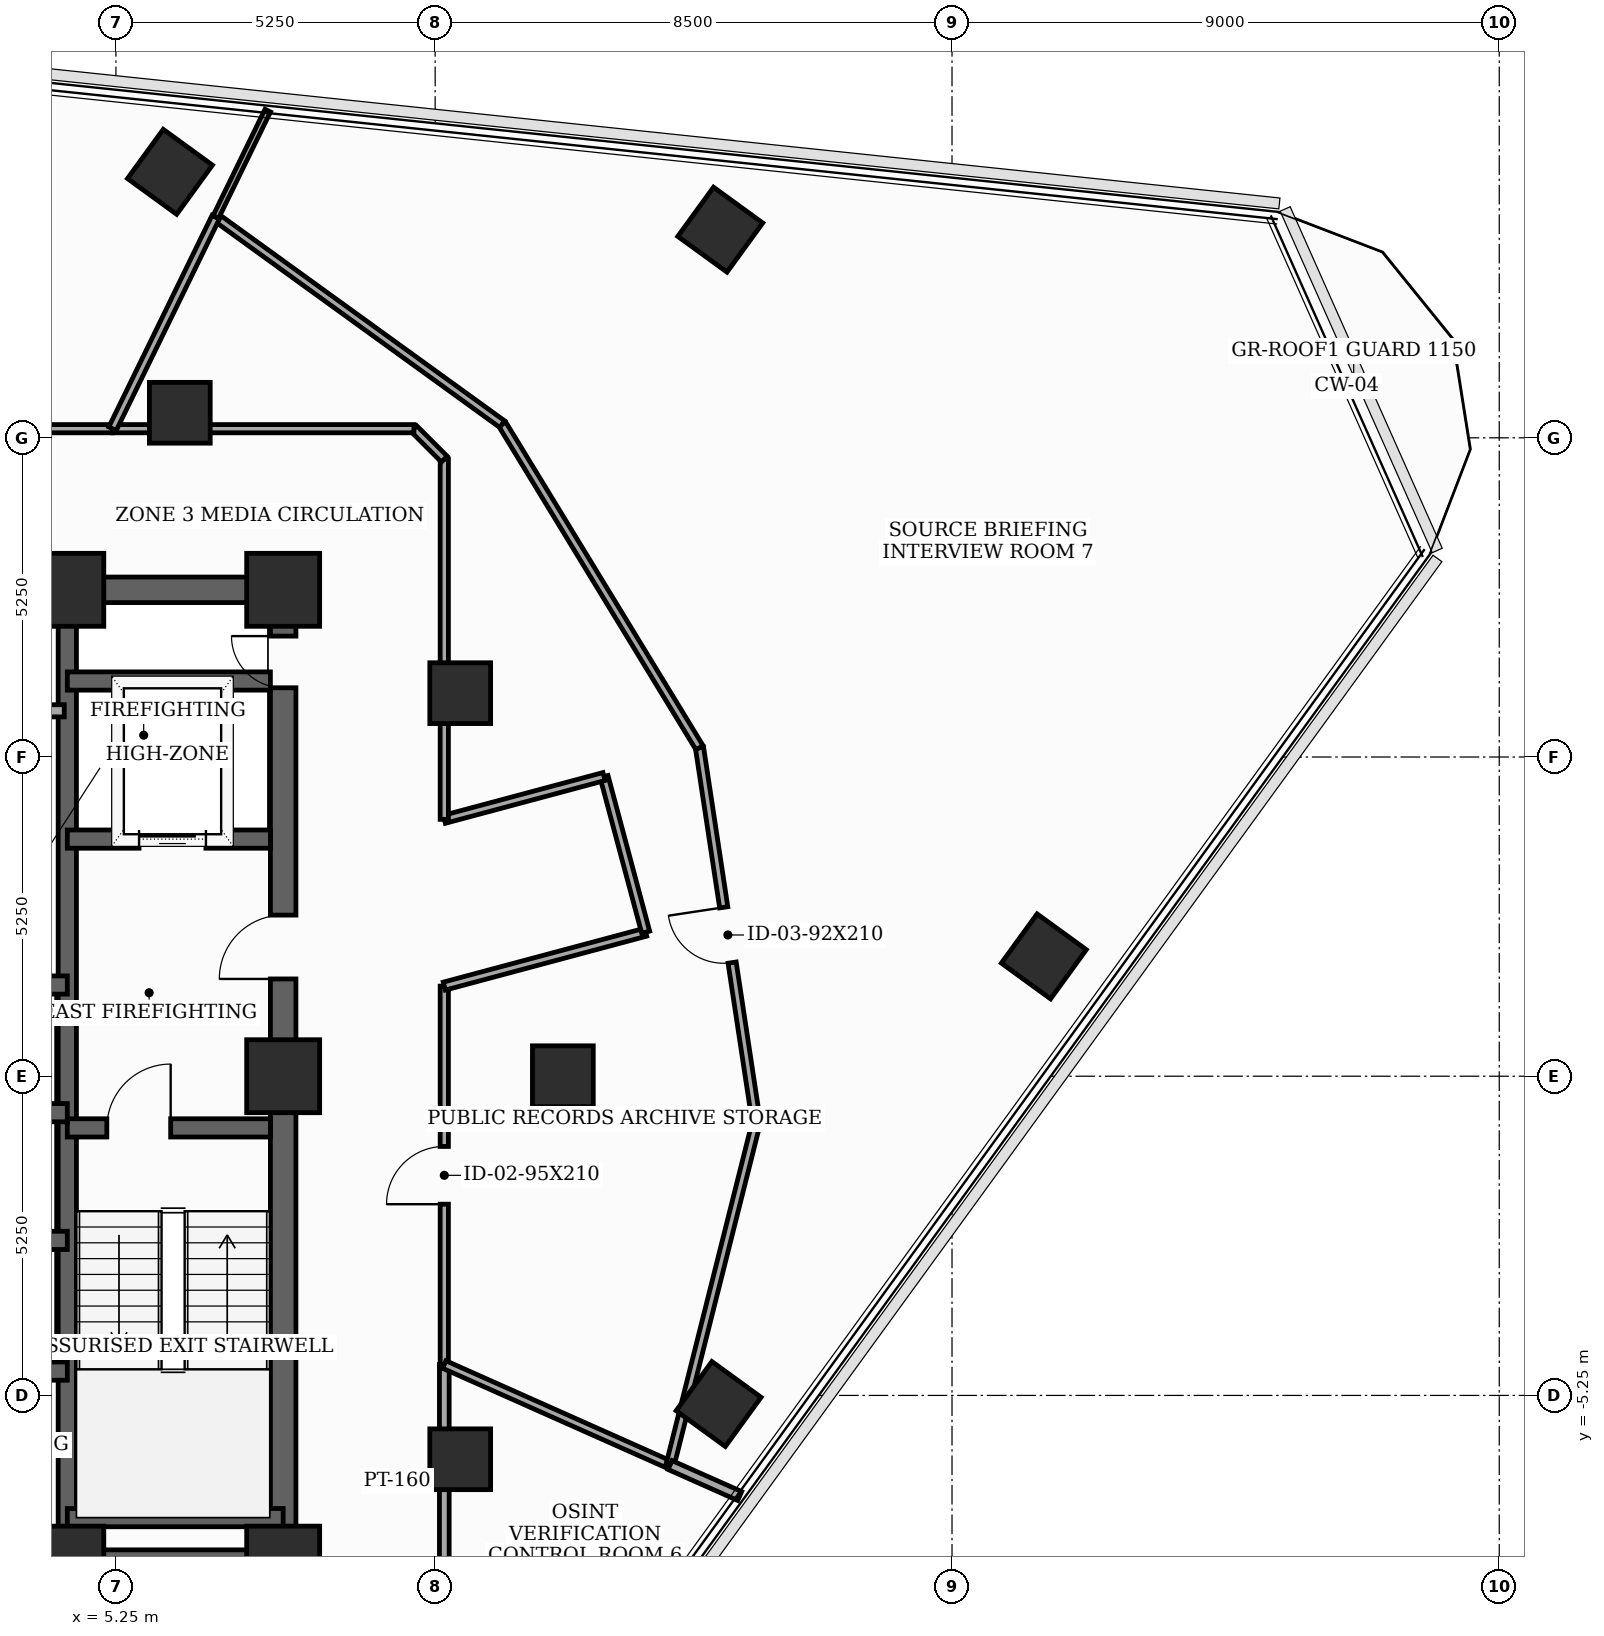
"""IFC4 building model, lengths in metres.
Left out: names, types, materials, properties, quantities, classifications, styles, units other than length and angle.
Written with IfcOpenShell. Run it as: python <this file> out.ifc"""

import sys

from ifc_helpers import new_model, si_unit, direction, frame, frame_2d, origin, origin_2d, place, context, subcontext, project, spatial, rectangle, extrude, element, fill, save


model = new_model("IFC4")
c1 = context("Model", 3, precision=1e-05, world=origin(), true_north=direction((0.0, 1.0)))
c2 = subcontext(c1, "Body", "Model", "MODEL_VIEW")
j1 = project(units=[si_unit("LENGTHUNIT", "METRE"), si_unit("PLANEANGLEUNIT", "RADIAN")], contexts=[c1])
p1 = place(None, origin())
s1 = spatial("IfcSite", under=j1, at=p1, CompositionType="ELEMENT")
p2 = place(p1, origin())
s2 = spatial("IfcBuilding", under=s1, at=p2, CompositionType="ELEMENT")
p3 = place(p2, frame((0.0, 0.0, 237.4)))
s3 = spatial("IfcBuildingStorey", under=s2, at=p3, CompositionType="ELEMENT", Elevation=237.4)
for number, where, z_axis, x_axis in (
    (1, (4.45, -8.0, 0.0), (0.0, 0.0, 1.0), (1.0, 0.0, 0.0)),
    (2, (8.0, -8.0, 0.0), (0.0, 0.0, 1.0), (1.0, 0.0, 0.0)),
    (3, (8.0, 0.0, 0.0), (0.0, 0.0, 1.0), (1.0, 0.0, 0.0)),
    (4, (8.0, 8.0, 0.0), (0.0, 0.0, 1.0), (1.0, 0.0, 0.0)),
    (5, (4.45, 8.0, 0.0), (0.0, 0.0, 1.0), (1.0, 0.0, 0.0)),
):
    element("IfcColumn", number, at=place(p3, frame(where, z_axis=z_axis, x_axis=x_axis)), inside=s3, PredefinedType="COLUMN", context=c2, shape_type="SweptSolid", body=[
        extrude(rectangle(XDim=1.2, YDim=1.2, at=origin_2d()), origin(), (0.0, 0.0, 1.0), 3.7),
    ])
for number, where, z_axis, x_axis in (
    (6, (12.6, 0.0, 0.0), (0.0, 0.0, 1.0), (1.0, 0.0, 0.0)),
    (7, (10.912, 6.3, 0.0), (0.0, 0.0, 1.0), (1.0, 0.0, 0.0)),
    (8, (6.3, 10.912, 0.0), (0.0, 0.0, 1.0), (1.0, 0.0, 0.0)),
    (9, (10.912, -6.3, 0.0), (0.0, 0.0, 1.0), (1.0, 0.0, 0.0)),
    (10, (15.161, -5.391, 0.0), (0.0, 0.0, 1.0), (0.588, 0.809, 0.0)),
    (11, (20.51, 1.971, 0.0), (0.0, 0.0, 1.0), (0.588, 0.809, 0.0)),
    (12, (15.188, 13.923, 0.0), (0.0, 0.0, 1.0), (0.588, 0.809, 0.0)),
    (13, (6.138, 14.875, 0.0), (0.0, 0.0, 1.0), (0.588, 0.809, 0.0)),
):
    element("IfcColumn", number, at=place(p3, frame(where, z_axis=z_axis, x_axis=x_axis)), inside=s3, PredefinedType="COLUMN", context=c2, shape_type="SweptSolid", body=[
        extrude(rectangle(XDim=1.0, YDim=1.0, at=origin_2d()), origin(), (0.0, 0.0, 1.0), 3.7),
    ])
p4 = place(p3, frame((8.0, -8.0, 0.0), z_axis=(0.0, 0.0, 1.0), x_axis=(0.0, 1.0, 0.0)))
e14 = element("IfcWall", 14, at=p4, inside=s3, PredefinedType="SHEAR", context=c2, shape_type="SweptSolid", body=[
    extrude(rectangle(XDim=16.0, YDim=0.42, at=frame_2d((8.0, 0.0))), origin(), (0.0, 0.0, 1.0), 3.5),
])
p5 = place(p4, frame((9.6, 0.0, 0.0)))
e15 = element("IfcOpeningElement", 15, at=p5, cuts=e14, PredefinedType="OPENING", context=c2, shape_type="SweptSolid", body=[
    extrude(rectangle(XDim=1.05, YDim=2.15, at=frame_2d((0.525, 1.075))), frame((0.0, 0.22, 0.0), z_axis=(0.0, -1.0, 0.0), x_axis=(1.0, 0.0, 0.0)), (0.0, 0.0, 1.0), 0.44),
])
p6 = place(p4, frame((14.389, 0.0, 0.0)))
e16 = element("IfcOpeningElement", 16, at=p6, cuts=e14, PredefinedType="OPENING", context=c2, shape_type="SweptSolid", body=[
    extrude(rectangle(XDim=0.85, YDim=2.02, at=frame_2d((0.425, 1.01))), frame((0.0, 0.22, 0.0), z_axis=(0.0, -1.0, 0.0), x_axis=(1.0, 0.0, 0.0)), (0.0, 0.0, 1.0), 0.44),
])
p7 = place(p3, frame((-8.0, -8.0, 0.0), z_axis=(0.0, 0.0, 1.0), x_axis=(1.0, 0.0, 0.0)))
e17 = element("IfcWall", 17, at=p7, inside=s3, PredefinedType="SHEAR", context=c2, shape_type="SweptSolid", body=[
    extrude(rectangle(XDim=16.0, YDim=0.42, at=frame_2d((8.0, 0.0))), origin(), (0.0, 0.0, 1.0), 3.5),
])
p8 = place(p7, frame((4.6, 0.0, 0.0)))
e18 = element("IfcOpeningElement", 18, at=p8, cuts=e17, PredefinedType="OPENING", context=c2, shape_type="SweptSolid", body=[
    extrude(rectangle(XDim=0.95, YDim=2.1, at=frame_2d((0.475, 1.05))), frame((0.0, 0.22, 0.0), z_axis=(0.0, -1.0, 0.0), x_axis=(1.0, 0.0, 0.0)), (0.0, 0.0, 1.0), 0.44),
])
p9 = place(p7, frame((7.52, 0.0, 0.0)))
e19 = element("IfcOpeningElement", 19, at=p9, cuts=e17, PredefinedType="OPENING", context=c2, shape_type="SweptSolid", body=[
    extrude(rectangle(XDim=0.95, YDim=2.1, at=frame_2d((0.475, 1.05))), frame((0.0, 0.22, 0.0), z_axis=(0.0, -1.0, 0.0), x_axis=(1.0, 0.0, 0.0)), (0.0, 0.0, 1.0), 0.44),
])
p10 = place(p7, frame((10.45, 0.0, 0.0)))
e20 = element("IfcOpeningElement", 20, at=p10, cuts=e17, PredefinedType="OPENING", context=c2, shape_type="SweptSolid", body=[
    extrude(rectangle(XDim=0.95, YDim=2.1, at=frame_2d((0.475, 1.05))), frame((0.0, 0.22, 0.0), z_axis=(0.0, -1.0, 0.0), x_axis=(1.0, 0.0, 0.0)), (0.0, 0.0, 1.0), 0.44),
])
p11 = place(p3, frame((-8.0, 8.0, 0.0), z_axis=(0.0, 0.0, 1.0), x_axis=(1.0, 0.0, 0.0)))
e21 = element("IfcWall", 21, at=p11, inside=s3, PredefinedType="SHEAR", context=c2, shape_type="SweptSolid", body=[
    extrude(rectangle(XDim=16.0, YDim=0.42, at=frame_2d((8.0, 0.0))), origin(), (0.0, 0.0, 1.0), 3.5),
])
p12 = place(p11, frame((7.1, 0.0, 0.0)))
e22 = element("IfcOpeningElement", 22, at=p12, cuts=e21, PredefinedType="OPENING", context=c2, shape_type="SweptSolid", body=[
    extrude(rectangle(XDim=1.8, YDim=2.15, at=frame_2d((0.9, 1.075))), frame((0.0, 0.22, 0.0), z_axis=(0.0, -1.0, 0.0), x_axis=(1.0, 0.0, 0.0)), (0.0, 0.0, 1.0), 0.44),
])
p13 = place(p3, frame((4.45, -7.79, 0.0), z_axis=(0.0, 0.0, 1.0), x_axis=(0.0, 1.0, 0.0)))
e23 = element("IfcWall", 23, at=p13, inside=s3, PredefinedType="SHEAR", context=c2, shape_type="SweptSolid", body=[
    extrude(rectangle(XDim=15.58, YDim=0.3, at=frame_2d((7.79, 0.0))), origin(), (0.0, 0.0, 1.0), 3.5),
])
p14 = place(p3, frame((4.45, -0.85, 0.0), z_axis=(0.0, 0.0, 1.0), x_axis=(1.0, 0.0, 0.0)))
e24 = element("IfcWall", 24, at=p14, inside=s3, PredefinedType="SHEAR", context=c2, shape_type="SweptSolid", body=[
    extrude(rectangle(XDim=3.34, YDim=0.3, at=frame_2d((1.67, 0.0))), origin(), (0.0, 0.0, 1.0), 3.5),
])
p15 = place(p14, frame((0.65, 0.0, 0.0)))
e25 = element("IfcOpeningElement", 25, at=p15, cuts=e24, PredefinedType="OPENING", context=c2, shape_type="SweptSolid", body=[
    extrude(rectangle(XDim=1.05, YDim=2.15, at=frame_2d((0.525, 1.075))), frame((0.0, 0.16, 0.0), z_axis=(0.0, -1.0, 0.0), x_axis=(1.0, 0.0, 0.0)), (0.0, 0.0, 1.0), 0.32),
])
p16 = place(p3, frame((4.45, -7.26, 0.0), z_axis=(0.0, 0.0, 1.0), x_axis=(1.0, 0.0, 0.0)))
e26 = element("IfcWall", 26, at=p16, inside=s3, PredefinedType="SHEAR", context=c2, shape_type="SweptSolid", body=[
    extrude(rectangle(XDim=3.55, YDim=0.3, at=frame_2d((1.775, 0.0))), origin(), (0.0, 0.0, 1.0), 3.5),
])
p17 = place(p3, frame((4.45, 3.9, 0.0), z_axis=(0.0, 0.0, 1.0), x_axis=(1.0, 0.0, 0.0)))
e27 = element("IfcWall", 27, at=p17, inside=s3, PredefinedType="SHEAR", context=c2, shape_type="SweptSolid", body=[
    extrude(rectangle(XDim=3.34, YDim=0.3, at=frame_2d((1.67, 0.0))), origin(), (0.0, 0.0, 1.0), 3.5),
])
p18 = place(p17, frame((1.18, 0.0, 0.0)))
e28 = element("IfcOpeningElement", 28, at=p18, cuts=e27, PredefinedType="OPENING", context=c2, shape_type="SweptSolid", body=[
    extrude(rectangle(XDim=1.1, YDim=2.1, at=frame_2d((0.55, 1.05))), frame((0.0, 0.16, 0.0), z_axis=(0.0, -1.0, 0.0), x_axis=(1.0, 0.0, 0.0)), (0.0, 0.0, 1.0), 0.32),
])
p19 = place(p3, frame((4.45, 6.5, 0.0), z_axis=(0.0, 0.0, 1.0), x_axis=(1.0, 0.0, 0.0)))
e29 = element("IfcWall", 29, at=p19, inside=s3, PredefinedType="SHEAR", context=c2, shape_type="SweptSolid", body=[
    extrude(rectangle(XDim=3.34, YDim=0.3, at=frame_2d((1.67, 0.0))), origin(), (0.0, 0.0, 1.0), 3.5),
])
p20 = place(p3, frame((-4.45, -4.85, 0.0), z_axis=(0.0, 0.0, 1.0), x_axis=(1.0, 0.0, 0.0)))
e30 = element("IfcWall", 30, at=p20, inside=s3, PredefinedType="SHEAR", context=c2, shape_type="SweptSolid", body=[
    extrude(rectangle(XDim=8.9, YDim=0.3, at=frame_2d((4.45, 0.0))), origin(), (0.0, 0.0, 1.0), 3.5),
])
for number, where, z_axis, x_axis in (
    (31, (1.68, 1.5, 0.0), (0.0, 0.0, 1.0), (1.0, 0.0, 0.0)),
    (32, (1.68, -2.7, 0.0), (0.0, 0.0, 1.0), (1.0, 0.0, 0.0)),
    (33, (1.68, -0.6, 0.0), (0.0, 0.0, 1.0), (1.0, 0.0, 0.0)),
):
    element("IfcWall", number, at=place(p3, frame(where, z_axis=z_axis, x_axis=x_axis)), inside=s3, PredefinedType="SHEAR", context=c2, shape_type="SweptSolid", body=[
        extrude(rectangle(XDim=2.77, YDim=0.3, at=frame_2d((1.385, 0.0))), origin(), (0.0, 0.0, 1.0), 3.5),
    ])
p21 = place(p3, frame((1.72, 6.01, 0.0), z_axis=(0.0, 0.0, 1.0), x_axis=(1.0, 0.0, 0.0)))
e34 = element("IfcWall", 34, at=p21, inside=s3, PredefinedType="SOLIDWALL", context=c2, shape_type="SweptSolid", body=[
    extrude(rectangle(XDim=2.68, YDim=0.2, at=frame_2d((1.34, 0.0))), origin(), (0.0, 0.0, 1.0), 3.5),
])
p22 = place(p3, frame((10.65, -4.742, 0.0), z_axis=(0.0, 0.0, 1.0), x_axis=(0.0, 1.0, 0.0)))
e35 = element("IfcWall", 35, at=p22, inside=s3, PredefinedType="PARTITIONING", context=c2, shape_type="SweptSolid", body=[
    extrude(rectangle(XDim=6.224, YDim=0.135, at=frame_2d((3.112, 0.0))), origin(), (0.0, 0.0, 1.0), 2.885),
])
p23 = place(p22, frame((2.637, 0.0, 0.0)))
e36 = element("IfcOpeningElement", 36, at=p23, cuts=e35, PredefinedType="OPENING", context=c2, shape_type="SweptSolid", body=[
    extrude(rectangle(XDim=0.95, YDim=2.1, at=frame_2d((0.475, 1.05))), frame((0.0, 0.077, 0.0), z_axis=(0.0, -1.0, 0.0), x_axis=(1.0, 0.0, 0.0)), (0.0, 0.0, 1.0), 0.155),
])
p24 = place(p3, frame((10.65, 1.482, 0.0), z_axis=(0.0, 0.0, 1.0), x_axis=(0.965961397105, 0.2586862565, 0.0)))
e37 = element("IfcWall", 37, at=p24, inside=s3, PredefinedType="PARTITIONING", context=c2, shape_type="SweptSolid", body=[
    extrude(rectangle(XDim=3.429, YDim=0.135, at=frame_2d((1.714, 0.0))), origin(), (0.0, 0.0, 1.0), 2.885),
])
p25 = place(p3, frame((13.962, 2.369, 0.0), z_axis=(0.0, 0.0, 1.0), x_axis=(-0.258413725385, 0.966034340245, 0.0)))
e38 = element("IfcWall", 38, at=p25, inside=s3, PredefinedType="PARTITIONING", context=c2, shape_type="SweptSolid", body=[
    extrude(rectangle(XDim=2.65, YDim=0.135, at=frame_2d((1.325, 0.0))), origin(), (0.0, 0.0, 1.0), 3.5),
])
p26 = place(p3, frame((13.277, 4.929, 0.0), z_axis=(0.0, 0.0, 1.0), x_axis=(-0.965934830229, -0.258785439601, 0.0)))
e39 = element("IfcWall", 39, at=p26, inside=s3, PredefinedType="PARTITIONING", context=c2, shape_type="SweptSolid", body=[
    extrude(rectangle(XDim=2.72, YDim=0.135, at=frame_2d((1.36, 0.0))), origin(), (0.0, 0.0, 1.0), 2.885),
])
p27 = place(p3, frame((10.65, 4.225, 0.0), z_axis=(0.0, 0.0, 1.0), x_axis=(0.0, 1.0, 0.0)))
e40 = element("IfcWall", 40, at=p27, inside=s3, PredefinedType="PARTITIONING", context=c2, shape_type="SweptSolid", body=[
    extrude(rectangle(XDim=5.925, YDim=0.135, at=frame_2d((2.962, 0.0))), origin(), (0.0, 0.0, 1.0), 2.885),
])
p28 = place(p3, frame((10.65, 10.15, 0.0), z_axis=(0.0, 0.0, 1.0), x_axis=(-0.707106781187, 0.707106781187, 0.0)))
e41 = element("IfcWall", 41, at=p28, inside=s3, PredefinedType="PARTITIONING", context=c2, shape_type="SweptSolid", body=[
    extrude(rectangle(XDim=0.707, YDim=0.135, at=frame_2d((0.354, 0.0))), origin(), (0.0, 0.0, 1.0), 3.5),
])
p29 = place(p3, frame((10.15, 10.65, 0.0), z_axis=(0.0, 0.0, 1.0), x_axis=(-1.0, 0.0, 0.0)))
e42 = element("IfcWall", 42, at=p29, inside=s3, PredefinedType="PARTITIONING", context=c2, shape_type="SweptSolid", body=[
    extrude(rectangle(XDim=4.956, YDim=0.135, at=frame_2d((2.478, 0.0))), origin(), (0.0, 0.0, 1.0), 2.885),
])
p30 = place(p3, frame((10.65, -10.15, 0.0), z_axis=(0.0, 0.0, 1.0), x_axis=(0.0, 1.0, 0.0)))
e43 = element("IfcWall", 43, at=p30, inside=s3, PredefinedType="PARTITIONING", context=c2, shape_type="SweptSolid", body=[
    extrude(rectangle(XDim=5.408, YDim=0.16, at=frame_2d((2.704, 0.0))), origin(), (0.0, 0.0, 1.0), 2.885),
])
p31 = place(p30, frame((0.582, 0.0, 0.0)))
e44 = element("IfcOpeningElement", 44, at=p31, cuts=e43, PredefinedType="OPENING", context=c2, shape_type="SweptSolid", body=[
    extrude(rectangle(XDim=1.0, YDim=2.15, at=frame_2d((0.5, 1.075))), frame((0.0, 0.09, 0.0), z_axis=(0.0, -1.0, 0.0), x_axis=(1.0, 0.0, 0.0)), (0.0, 0.0, 1.0), 0.18),
])
p32 = place(p3, frame((5.194, 10.65, 0.0), z_axis=(0.0, 0.0, 1.0), x_axis=(-1.0, 0.0, 0.0)))
e45 = element("IfcWall", 45, at=p32, inside=s3, PredefinedType="PARTITIONING", context=c2, shape_type="SweptSolid", body=[
    extrude(rectangle(XDim=6.344, YDim=0.135, at=frame_2d((3.172, 0.0))), origin(), (0.0, 0.0, 1.0), 2.885),
])
p33 = place(p32, frame((2.372, 0.0, 0.0)))
e46 = element("IfcOpeningElement", 46, at=p33, cuts=e45, PredefinedType="OPENING", context=c2, shape_type="SweptSolid", body=[
    extrude(rectangle(XDim=1.6, YDim=2.15, at=frame_2d((0.8, 1.075))), frame((0.0, 0.077, 0.0), z_axis=(0.0, -1.0, 0.0), x_axis=(1.0, 0.0, 0.0)), (0.0, 0.0, 1.0), 0.155),
])
p34 = place(p3, frame((10.65, -4.742, 0.0), z_axis=(0.0, 0.0, 1.0), x_axis=(0.913556239153, -0.406712426544, 0.0)))
e47 = element("IfcWall", 47, at=p34, inside=s3, PredefinedType="PARTITIONING", context=c2, shape_type="SweptSolid", body=[
    extrude(rectangle(XDim=4.064, YDim=0.135, at=frame_2d((2.032, 0.0))), origin(), (0.0, 0.0, 1.0), 2.885),
])
p35 = place(p3, frame((14.363, -6.395, 0.0), z_axis=(0.0, 0.0, 1.0), x_axis=(0.244106617879, 0.969748399899, 0.0)))
e48 = element("IfcWall", 48, at=p35, inside=s3, PredefinedType="PARTITIONING", context=c2, shape_type="SweptSolid", body=[
    extrude(rectangle(XDim=5.813, YDim=0.135, at=frame_2d((2.906, 0.0))), origin(), (0.0, 0.0, 1.0), 2.985),
])
p36 = place(p3, frame((15.782, -0.758, 0.0), z_axis=(0.0, 0.0, 1.0), x_axis=(-0.150025845784, 0.988682075086, 0.0)))
e49 = element("IfcWall", 49, at=p36, inside=s3, PredefinedType="PARTITIONING", context=c2, shape_type="SweptSolid", body=[
    extrude(rectangle(XDim=6.233, YDim=0.135, at=frame_2d((3.116, 0.0))), origin(), (0.0, 0.0, 1.0), 2.985),
])
p37 = place(p36, frame((2.656, 0.0, 0.0)))
e50 = element("IfcOpeningElement", 50, at=p37, cuts=e49, PredefinedType="OPENING", context=c2, shape_type="SweptSolid", body=[
    extrude(rectangle(XDim=0.92, YDim=2.1, at=frame_2d((0.46, 1.05))), frame((0.0, 0.077, 0.0), z_axis=(0.0, -1.0, 0.0), x_axis=(1.0, 0.0, 0.0)), (0.0, 0.0, 1.0), 0.155),
])
p38 = place(p3, frame((14.847, 5.404, 0.0), z_axis=(0.0, 0.0, 1.0), x_axis=(-0.520646426704, 0.853772392597, 0.0)))
e51 = element("IfcWall", 51, at=p38, inside=s3, PredefinedType="PARTITIONING", context=c2, shape_type="SweptSolid", body=[
    extrude(rectangle(XDim=6.232, YDim=0.135, at=frame_2d((3.116, 0.0))), origin(), (0.0, 0.0, 1.0), 2.985),
])
p39 = place(p3, frame((11.602, 10.725, 0.0), z_axis=(0.0, 0.0, 1.0), x_axis=(-0.810322435649, 0.58598425771, 0.0)))
e52 = element("IfcWall", 52, at=p39, inside=s3, PredefinedType="PARTITIONING", context=c2, shape_type="SweptSolid", body=[
    extrude(rectangle(XDim=5.812, YDim=0.135, at=frame_2d((2.906, 0.0))), origin(), (0.0, 0.0, 1.0), 3.5),
])
p40 = place(p3, frame((6.892, 14.131, 0.0), z_axis=(0.0, 0.0, 1.0), x_axis=(-0.438392584888, -0.898783589923, 0.0)))
e53 = element("IfcWall", 53, at=p40, inside=s3, PredefinedType="PARTITIONING", context=c2, shape_type="SweptSolid", body=[
    extrude(rectangle(XDim=3.873, YDim=0.135, at=frame_2d((1.937, 0.0))), origin(), (0.0, 0.0, 1.0), 2.885),
])
p41 = place(p3, frame((15.508, -6.905, 0.0), z_axis=(0.0, 0.0, 1.0), x_axis=(-0.913626692327, 0.406554137929, 0.0)))
e54 = element("IfcWall", 54, at=p41, inside=s3, PredefinedType="PARTITIONING", context=c2, shape_type="SweptSolid", body=[
    extrude(rectangle(XDim=1.253, YDim=0.16, at=frame_2d((0.626, 0.0))), origin(), (0.0, 0.0, 1.0), 3.035),
])
p42 = place(p3, frame((7.747, 15.882, 0.0), z_axis=(0.0, 0.0, 1.0), x_axis=(-0.438571753549, -0.898696176129, 0.0)))
e55 = element("IfcWall", 55, at=p42, inside=s3, PredefinedType="MOVABLE", context=c2, shape_type="SweptSolid", body=[
    extrude(rectangle(XDim=1.948, YDim=0.1, at=frame_2d((0.974, 0.0))), origin(), (0.0, 0.0, 1.0), 3.035),
])
p43 = place(p5, origin())
e56 = element("IfcDoor", 56, at=p43, inside=s3, OperationType="SINGLE_SWING_LEFT", PredefinedType="DOOR", context=c2, shape_type="SweptSolid", body=[
    extrude(rectangle(XDim=1.05, YDim=2.15, at=frame_2d((0.525, 1.075))), frame((0.0, 0.025, 0.0), z_axis=(0.0, -1.0, 0.0), x_axis=(1.0, 0.0, 0.0)), (0.0, 0.0, 1.0), 0.05),
])
fill(e15, e56)
p44 = place(p6, origin())
e57 = element("IfcDoor", 57, at=p44, inside=s3, OperationType="SINGLE_SWING_RIGHT", PredefinedType="TRAPDOOR", context=c2, shape_type="SweptSolid", body=[
    extrude(rectangle(XDim=0.85, YDim=2.02, at=frame_2d((0.425, 1.01))), frame((0.0, 0.025, 0.0), z_axis=(0.0, -1.0, 0.0), x_axis=(1.0, 0.0, 0.0)), (0.0, 0.0, 1.0), 0.05),
])
fill(e16, e57)
p45 = place(p15, origin())
e58 = element("IfcDoor", 58, at=p45, inside=s3, OperationType="SINGLE_SWING_RIGHT", PredefinedType="DOOR", context=c2, shape_type="SweptSolid", body=[
    extrude(rectangle(XDim=1.05, YDim=2.15, at=frame_2d((0.525, 1.075))), frame((0.0, 0.025, 0.0), z_axis=(0.0, -1.0, 0.0), x_axis=(1.0, 0.0, 0.0)), (0.0, 0.0, 1.0), 0.05),
])
fill(e25, e58)
p46 = place(p18, origin())
e59 = element("IfcDoor", 59, at=p46, inside=s3, OperationType="SLIDING_TO_LEFT", PredefinedType="DOOR", context=c2, shape_type="SweptSolid", body=[
    extrude(rectangle(XDim=1.1, YDim=2.1, at=frame_2d((0.55, 1.05))), frame((0.0, 0.025, 0.0), z_axis=(0.0, -1.0, 0.0), x_axis=(1.0, 0.0, 0.0)), (0.0, 0.0, 1.0), 0.05),
])
fill(e28, e59)
p47 = place(p23, origin())
e60 = element("IfcDoor", 60, at=p47, inside=s3, OperationType="SINGLE_SWING_LEFT", PredefinedType="DOOR", context=c2, shape_type="SweptSolid", body=[
    extrude(rectangle(XDim=0.95, YDim=2.1, at=frame_2d((0.475, 1.05))), frame((0.0, 0.025, 0.0), z_axis=(0.0, -1.0, 0.0), x_axis=(1.0, 0.0, 0.0)), (0.0, 0.0, 1.0), 0.05),
])
fill(e36, e60)
p48 = place(p37, origin())
e61 = element("IfcDoor", 61, at=p48, inside=s3, OperationType="SINGLE_SWING_RIGHT", PredefinedType="DOOR", context=c2, shape_type="SweptSolid", body=[
    extrude(rectangle(XDim=0.92, YDim=2.1, at=frame_2d((0.46, 1.05))), frame((0.0, 0.025, 0.0), z_axis=(0.0, -1.0, 0.0), x_axis=(1.0, 0.0, 0.0)), (0.0, 0.0, 1.0), 0.05),
])
fill(e50, e61)
save(model, sys.argv[1])
